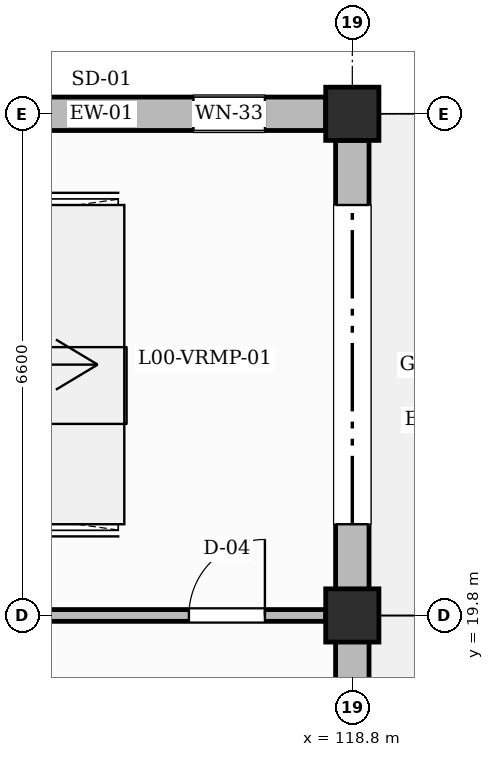
"""IFC4 building model, lengths in metres.
Left out: names, types, materials, properties, quantities, classifications, styles, units other than length and angle.
Written with IfcOpenShell. Run it as: python <this file> out.ifc"""

import sys

from ifc_helpers import new_model, si_unit, direction, frame, frame_2d, origin, origin_2d, place, context, subcontext, project, spatial, rectangle, circle, extrude, element, fill, save


model = new_model("IFC4")
c1 = context("Model", 3, precision=1e-05, world=origin(), true_north=direction((0.0, 1.0)))
c2 = subcontext(c1, "Body", "Model", "MODEL_VIEW")
j1 = project(units=[si_unit("LENGTHUNIT", "METRE"), si_unit("PLANEANGLEUNIT", "RADIAN")], contexts=[c1])
p1 = place(None, origin())
s1 = spatial("IfcSite", under=j1, at=p1, CompositionType="ELEMENT")
p2 = place(p1, origin())
s2 = spatial("IfcBuilding", under=s1, at=p2, CompositionType="ELEMENT")
p3 = place(p2, origin())
s3 = spatial("IfcBuildingStorey", under=s2, at=p3, CompositionType="ELEMENT", Elevation=0.0)
for number, where, z_axis, x_axis in (
    (1, (118.8, 19.8, 0.0), (0.0, 0.0, 1.0), (1.0, 0.0, 0.0)),
    (2, (118.8, 26.4, 0.0), (0.0, 0.0, 1.0), (1.0, 0.0, 0.0)),
):
    element("IfcColumn", number, at=place(p3, frame(where, z_axis=z_axis, x_axis=x_axis)), inside=s3, PredefinedType="COLUMN", context=c2, shape_type="SweptSolid", body=[
        extrude(circle(Radius=0.35, at=origin_2d()), origin(), (0.0, 0.0, 1.0), 5.4),
    ])
p4 = place(p3, frame((118.8, 13.55, 0.0), z_axis=(0.0, 0.0, 1.0), x_axis=(0.0, 1.0, 0.0)))
e3 = element("IfcWall", 3, at=p4, inside=s3, PredefinedType="SOLIDWALL", context=c2, shape_type="SweptSolid", body=[
    extrude(rectangle(XDim=5.9, YDim=0.44, at=frame_2d((2.95, 0.0))), origin(), (0.0, 0.0, 1.0), 4.45),
])
p5 = place(p4, frame((2.025, 0.0, 0.0)))
e4 = element("IfcOpeningElement", 4, at=p5, cuts=e3, PredefinedType="OPENING", context=c2, shape_type="SweptSolid", body=[
    extrude(rectangle(XDim=1.85, YDim=2.35, at=frame_2d((0.925, 1.175))), frame((0.0, 0.23, 0.0), z_axis=(0.0, -1.0, 0.0), x_axis=(1.0, 0.0, 0.0)), (0.0, 0.0, 1.0), 0.46),
])
p6 = place(p3, frame((112.55, 26.4, 0.0), z_axis=(0.0, 0.0, 1.0), x_axis=(1.0, 0.0, 0.0)))
e5 = element("IfcWall", 5, at=p6, inside=s3, PredefinedType="SOLIDWALL", context=c2, shape_type="SweptSolid", body=[
    extrude(rectangle(XDim=5.9, YDim=0.44, at=frame_2d((2.95, 0.0))), origin(), (0.0, 0.0, 1.0), 4.45),
])
p7 = place(p6, frame((0.8, 0.0, 0.95)))
e6 = element("IfcOpeningElement", 6, at=p7, cuts=e5, PredefinedType="OPENING", context=c2, shape_type="SweptSolid", body=[
    extrude(rectangle(XDim=0.94, YDim=2.12, at=frame_2d((0.47, 1.06))), frame((0.0, 0.23, 0.0), z_axis=(0.0, -1.0, 0.0), x_axis=(1.0, 0.0, 0.0)), (0.0, 0.0, 1.0), 0.46),
])
p8 = place(p6, frame((4.16, 0.0, 0.95)))
e7 = element("IfcOpeningElement", 7, at=p8, cuts=e5, PredefinedType="OPENING", context=c2, shape_type="SweptSolid", body=[
    extrude(rectangle(XDim=0.94, YDim=2.12, at=frame_2d((0.47, 1.06))), frame((0.0, 0.23, 0.0), z_axis=(0.0, -1.0, 0.0), x_axis=(1.0, 0.0, 0.0)), (0.0, 0.0, 1.0), 0.46),
])
p9 = place(p3, frame((118.8, 20.15, 0.0), z_axis=(0.0, 0.0, 1.0), x_axis=(0.0, 1.0, 0.0)))
e8 = element("IfcWall", 8, at=p9, inside=s3, PredefinedType="SOLIDWALL", context=c2, shape_type="SweptSolid", body=[
    extrude(rectangle(XDim=5.9, YDim=0.44, at=frame_2d((2.95, 0.0))), origin(), (0.0, 0.0, 1.0), 4.45),
])
p10 = place(p9, frame((0.85, 0.0, 0.0)))
e9 = element("IfcOpeningElement", 9, at=p10, cuts=e8, PredefinedType="OPENING", context=c2, shape_type="SweptSolid", body=[
    extrude(rectangle(XDim=4.2, YDim=2.8, at=frame_2d((2.1, 1.4))), frame((0.0, 0.23, 0.0), z_axis=(0.0, -1.0, 0.0), x_axis=(1.0, 0.0, 0.0)), (0.0, 0.0, 1.0), 0.46),
])
p11 = place(p3, frame((112.55, 19.8, 0.0), z_axis=(0.0, 0.0, 1.0), x_axis=(1.0, 0.0, 0.0)))
e10 = element("IfcWall", 10, at=p11, inside=s3, PredefinedType="PARTITIONING", context=c2, shape_type="SweptSolid", body=[
    extrude(rectangle(XDim=5.9, YDim=0.155, at=frame_2d((2.95, 0.0))), origin(), (0.0, 0.0, 1.0), 4.2),
])
p12 = place(p11, frame((4.1, 0.0, 0.0)))
e11 = element("IfcOpeningElement", 11, at=p12, cuts=e10, PredefinedType="OPENING", context=c2, shape_type="SweptSolid", body=[
    extrude(rectangle(XDim=1.0, YDim=2.1, at=frame_2d((0.5, 1.05))), frame((0.0, 0.087, 0.0), z_axis=(0.0, -1.0, 0.0), x_axis=(1.0, 0.0, 0.0)), (0.0, 0.0, 1.0), 0.175),
])
p13 = place(p8, origin())
e12 = element("IfcWindow", 12, at=p13, inside=s3, PartitioningType="SINGLE_PANEL", PredefinedType="WINDOW", context=c2, shape_type="SweptSolid", body=[
    extrude(rectangle(XDim=0.94, YDim=2.12, at=frame_2d((0.47, 1.06))), frame((0.0, 0.03, 0.0), z_axis=(0.0, -1.0, 0.0), x_axis=(1.0, 0.0, 0.0)), (0.0, 0.0, 1.0), 0.06),
])
fill(e7, e12)
p14 = place(p10, origin())
e13 = element("IfcDoor", 13, at=p14, inside=s3, OperationType="ROLLINGUP", PredefinedType="GATE", context=c2, shape_type="SweptSolid", body=[
    extrude(rectangle(XDim=4.2, YDim=2.8, at=frame_2d((2.1, 1.4))), frame((0.0, 0.025, 0.0), z_axis=(0.0, -1.0, 0.0), x_axis=(1.0, 0.0, 0.0)), (0.0, 0.0, 1.0), 0.05),
])
fill(e9, e13)
p15 = place(p12, origin())
e14 = element("IfcDoor", 14, at=p15, inside=s3, OperationType="SINGLE_SWING_RIGHT", PredefinedType="DOOR", context=c2, shape_type="SweptSolid", body=[
    extrude(rectangle(XDim=1.0, YDim=2.1, at=frame_2d((0.5, 1.05))), frame((0.0, 0.025, 0.0), z_axis=(0.0, -1.0, 0.0), x_axis=(1.0, 0.0, 0.0)), (0.0, 0.0, 1.0), 0.05),
])
fill(e11, e14)
save(model, sys.argv[1])
